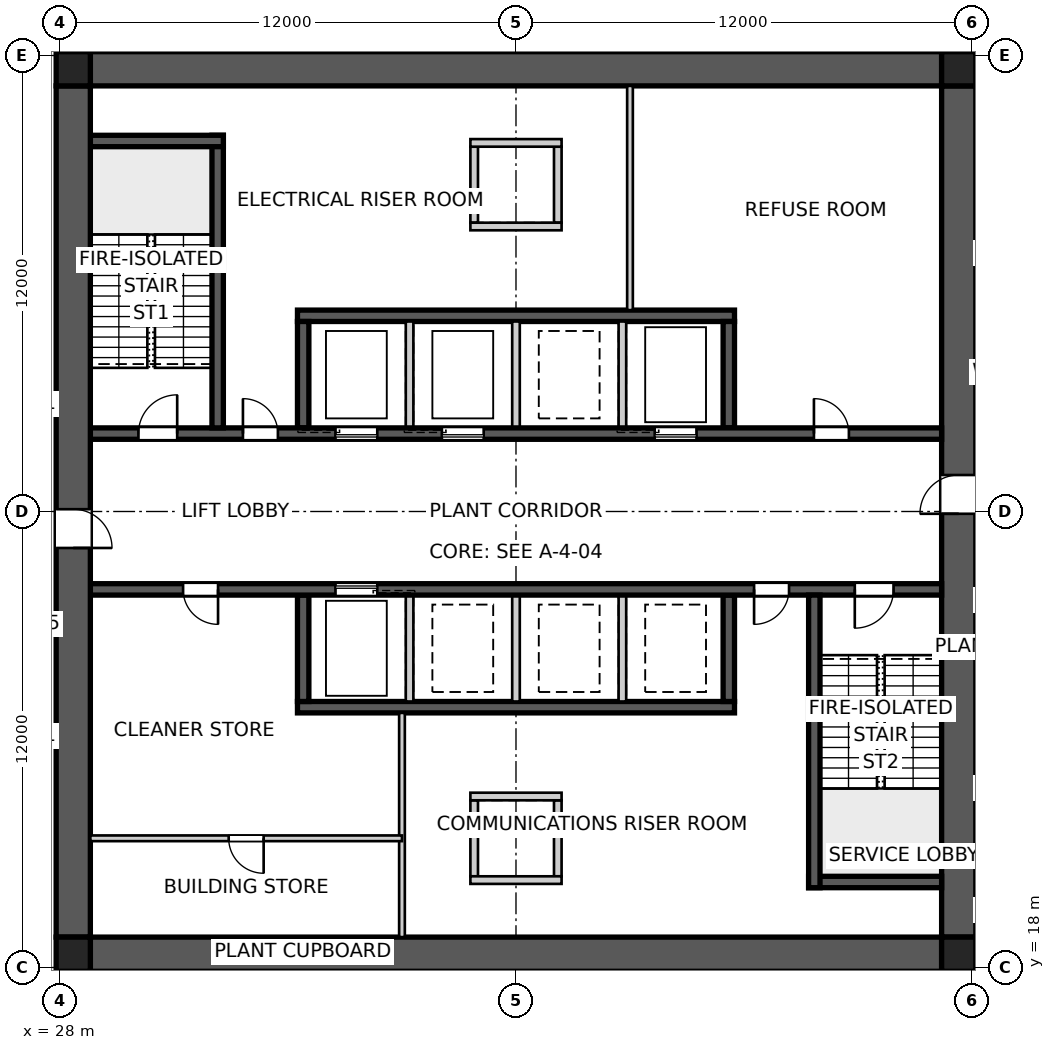
"""IFC4 building model, lengths in metres.
Left out: names, types, materials, properties, quantities, classifications, styles, units other than length and angle.
Written with IfcOpenShell. Run it as: python <this file> out.ifc"""

import sys

from ifc_helpers import new_model, si_unit, direction, frame, frame_2d, origin, origin_2d, place, context, subcontext, project, spatial, polyline, rectangle, outline, extrude, element, fill, save


model = new_model("IFC4")
c1 = context("Model", 3, precision=1e-05, world=origin(), true_north=direction((0.0, 1.0)))
c2 = subcontext(c1, "Body", "Model", "MODEL_VIEW")
j1 = project(units=[si_unit("LENGTHUNIT", "METRE"), si_unit("PLANEANGLEUNIT", "RADIAN")], contexts=[c1])
p1 = place(None, origin())
s1 = spatial("IfcSite", under=j1, at=p1, CompositionType="ELEMENT")
p2 = place(p1, origin())
s2 = spatial("IfcBuilding", under=s1, at=p2, CompositionType="ELEMENT")
p3 = place(p2, frame((0.0, 0.0, 106.6)))
s3 = spatial("IfcBuildingStorey", under=s2, at=p3, CompositionType="ELEMENT", Elevation=106.6)
for number, where, z_axis, x_axis in (
    (1, (28.8, 41.65, 0.0), (0.0, 0.0, 1.0), (1.0, 0.0, 0.0)),
    (2, (51.2, 18.35, 0.0), (0.0, 0.0, 1.0), (-1.0, 0.0, 0.0)),
):
    element("IfcWall", number, at=place(p3, frame(where, z_axis=z_axis, x_axis=x_axis)), inside=s3, PredefinedType="SHEAR", context=c2, shape_type="SweptSolid", body=[
        extrude(outline(polyline([(0.0, -0.45), (22.4, -0.45), (22.4, -0.025), (22.85, -0.025), (22.85, 0.025), (22.4, 0.025), (22.4, 0.45), (0.0, 0.45), (0.0, 0.025), (-0.45, 0.025), (-0.45, -0.025), (0.0, -0.025), (0.0, -0.45)])), origin(), (0.0, 0.0, 1.0), 5.0),
    ])
p4 = place(p3, frame((51.65, 18.8, 0.0), z_axis=(0.0, 0.0, 1.0), x_axis=(0.0, 1.0, 0.0)))
e3 = element("IfcWall", 3, at=p4, inside=s3, PredefinedType="SHEAR", context=c2, shape_type="SweptSolid", body=[
    extrude(outline(polyline([(0.0, -0.45), (22.4, -0.45), (22.4, -0.025), (22.85, -0.025), (22.85, 0.025), (22.4, 0.025), (22.4, 0.45), (0.0, 0.45), (0.0, 0.025), (-0.45, 0.025), (-0.45, -0.025), (0.0, -0.025), (0.0, -0.45)])), origin(), (0.0, 0.0, 1.0), 5.0),
])
p5 = place(p4, frame((11.14, 0.0, 0.0)))
e4 = element("IfcOpeningElement", 4, at=p5, cuts=e3, PredefinedType="OPENING", context=c2, shape_type="SweptSolid", body=[
    extrude(rectangle(XDim=1.02, YDim=2.4, at=frame_2d((0.51, 1.2))), frame((0.0, 0.46, 0.0), z_axis=(0.0, -1.0, 0.0), x_axis=(1.0, 0.0, 0.0)), (0.0, 0.0, 1.0), 0.92),
])
p6 = place(p3, frame((28.35, 41.2, 0.0), z_axis=(0.0, 0.0, 1.0), x_axis=(0.0, -1.0, 0.0)))
e5 = element("IfcWall", 5, at=p6, inside=s3, PredefinedType="SHEAR", context=c2, shape_type="SweptSolid", body=[
    extrude(outline(polyline([(0.0, -0.45), (22.4, -0.45), (22.4, -0.025), (22.85, -0.025), (22.85, 0.025), (22.4, 0.025), (22.4, 0.45), (0.0, 0.45), (0.0, 0.025), (-0.45, 0.025), (-0.45, -0.025), (0.0, -0.025), (0.0, -0.45)])), origin(), (0.0, 0.0, 1.0), 5.0),
])
p7 = place(p6, frame((11.14, 0.0, 0.0)))
e6 = element("IfcOpeningElement", 6, at=p7, cuts=e5, PredefinedType="OPENING", context=c2, shape_type="SweptSolid", body=[
    extrude(rectangle(XDim=1.02, YDim=2.4, at=frame_2d((0.51, 1.2))), frame((0.0, 0.46, 0.0), z_axis=(0.0, -1.0, 0.0), x_axis=(1.0, 0.0, 0.0)), (0.0, 0.0, 1.0), 0.92),
])
p8 = place(p3, frame((28.8, 32.05, 0.0), z_axis=(0.0, 0.0, 1.0), x_axis=(1.0, 0.0, 0.0)))
e7 = element("IfcWall", 7, at=p8, inside=s3, PredefinedType="SHEAR", context=c2, shape_type="SweptSolid", body=[
    extrude(rectangle(XDim=22.4, YDim=0.3, at=frame_2d((11.2, 0.0))), origin(), (0.0, 0.0, 1.0), 5.0),
])
p9 = place(p8, frame((19.04, 0.0, 0.0)))
e8 = element("IfcOpeningElement", 8, at=p9, cuts=e7, PredefinedType="OPENING", context=c2, shape_type="SweptSolid", body=[
    extrude(rectangle(XDim=0.92, YDim=2.1, at=frame_2d((0.46, 1.05))), frame((0.0, 0.16, 0.0), z_axis=(0.0, -1.0, 0.0), x_axis=(1.0, 0.0, 0.0)), (0.0, 0.0, 1.0), 0.32),
])
p10 = place(p8, frame((1.265, 0.0, 0.0)))
e9 = element("IfcOpeningElement", 9, at=p10, cuts=e7, PredefinedType="OPENING", context=c2, shape_type="SweptSolid", body=[
    extrude(rectangle(XDim=1.02, YDim=2.1, at=frame_2d((0.51, 1.05))), frame((0.0, 0.16, 0.0), z_axis=(0.0, -1.0, 0.0), x_axis=(1.0, 0.0, 0.0)), (0.0, 0.0, 1.0), 0.32),
])
p11 = place(p8, frame((4.015, 0.0, 0.0)))
e10 = element("IfcOpeningElement", 10, at=p11, cuts=e7, PredefinedType="OPENING", context=c2, shape_type="SweptSolid", body=[
    extrude(rectangle(XDim=0.92, YDim=2.1, at=frame_2d((0.46, 1.05))), frame((0.0, 0.16, 0.0), z_axis=(0.0, -1.0, 0.0), x_axis=(1.0, 0.0, 0.0)), (0.0, 0.0, 1.0), 0.32),
])
p12 = place(p8, frame((6.45, 0.0, 0.0)))
e11 = element("IfcOpeningElement", 11, at=p12, cuts=e7, PredefinedType="OPENING", context=c2, shape_type="SweptSolid", body=[
    extrude(rectangle(XDim=1.1, YDim=2.1, at=frame_2d((0.55, 1.05))), frame((0.0, 0.16, 0.0), z_axis=(0.0, -1.0, 0.0), x_axis=(1.0, 0.0, 0.0)), (0.0, 0.0, 1.0), 0.32),
])
p13 = place(p8, frame((9.25, 0.0, 0.0)))
e12 = element("IfcOpeningElement", 12, at=p13, cuts=e7, PredefinedType="OPENING", context=c2, shape_type="SweptSolid", body=[
    extrude(rectangle(XDim=1.1, YDim=2.1, at=frame_2d((0.55, 1.05))), frame((0.0, 0.16, 0.0), z_axis=(0.0, -1.0, 0.0), x_axis=(1.0, 0.0, 0.0)), (0.0, 0.0, 1.0), 0.32),
])
p14 = place(p8, frame((14.85, 0.0, 0.0)))
e13 = element("IfcOpeningElement", 13, at=p14, cuts=e7, PredefinedType="OPENING", context=c2, shape_type="SweptSolid", body=[
    extrude(rectangle(XDim=1.1, YDim=2.1, at=frame_2d((0.55, 1.05))), frame((0.0, 0.16, 0.0), z_axis=(0.0, -1.0, 0.0), x_axis=(1.0, 0.0, 0.0)), (0.0, 0.0, 1.0), 0.32),
])
p15 = place(p3, frame((51.2, 27.95, 0.0), z_axis=(0.0, 0.0, 1.0), x_axis=(-1.0, 0.0, 0.0)))
e14 = element("IfcWall", 14, at=p15, inside=s3, PredefinedType="SHEAR", context=c2, shape_type="SweptSolid", body=[
    extrude(rectangle(XDim=22.4, YDim=0.3, at=frame_2d((11.2, 0.0))), origin(), (0.0, 0.0, 1.0), 5.0),
])
p16 = place(p15, frame((19.04, 0.0, 0.0)))
e15 = element("IfcOpeningElement", 15, at=p16, cuts=e14, PredefinedType="OPENING", context=c2, shape_type="SweptSolid", body=[
    extrude(rectangle(XDim=0.92, YDim=2.1, at=frame_2d((0.46, 1.05))), frame((0.0, 0.16, 0.0), z_axis=(0.0, -1.0, 0.0), x_axis=(1.0, 0.0, 0.0)), (0.0, 0.0, 1.0), 0.32),
])
p17 = place(p15, frame((1.265, 0.0, 0.0)))
e16 = element("IfcOpeningElement", 16, at=p17, cuts=e14, PredefinedType="OPENING", context=c2, shape_type="SweptSolid", body=[
    extrude(rectangle(XDim=1.02, YDim=2.1, at=frame_2d((0.51, 1.05))), frame((0.0, 0.16, 0.0), z_axis=(0.0, -1.0, 0.0), x_axis=(1.0, 0.0, 0.0)), (0.0, 0.0, 1.0), 0.32),
])
p18 = place(p15, frame((4.015, 0.0, 0.0)))
e17 = element("IfcOpeningElement", 17, at=p18, cuts=e14, PredefinedType="OPENING", context=c2, shape_type="SweptSolid", body=[
    extrude(rectangle(XDim=0.92, YDim=2.1, at=frame_2d((0.46, 1.05))), frame((0.0, 0.16, 0.0), z_axis=(0.0, -1.0, 0.0), x_axis=(1.0, 0.0, 0.0)), (0.0, 0.0, 1.0), 0.32),
])
p19 = place(p15, frame((14.85, 0.0, 0.0)))
e18 = element("IfcOpeningElement", 18, at=p19, cuts=e14, PredefinedType="OPENING", context=c2, shape_type="SweptSolid", body=[
    extrude(rectangle(XDim=1.1, YDim=2.1, at=frame_2d((0.55, 1.05))), frame((0.0, 0.16, 0.0), z_axis=(0.0, -1.0, 0.0), x_axis=(1.0, 0.0, 0.0)), (0.0, 0.0, 1.0), 0.32),
])
for number, where, z_axis, x_axis in (
    (19, (34.25, 35.15, 0.0), (0.0, 0.0, 1.0), (1.0, 0.0, 0.0)),
    (20, (45.75, 24.85, 0.0), (0.0, 0.0, 1.0), (-1.0, 0.0, 0.0)),
):
    element("IfcWall", number, at=place(p3, frame(where, z_axis=z_axis, x_axis=x_axis)), inside=s3, PredefinedType="SHEAR", context=c2, shape_type="SweptSolid", body=[
        extrude(rectangle(XDim=11.5, YDim=0.3, at=frame_2d((5.75, 0.0))), origin(), (0.0, 0.0, 1.0), 5.0),
    ])
for number, where, z_axis, x_axis in (
    (21, (34.4, 32.2, 0.0), (0.0, 0.0, 1.0), (0.0, 1.0, 0.0)),
    (22, (45.6, 27.8, 0.0), (0.0, 0.0, 1.0), (0.0, -1.0, 0.0)),
):
    element("IfcWall", number, at=place(p3, frame(where, z_axis=z_axis, x_axis=x_axis)), inside=s3, PredefinedType="SHEAR", context=c2, shape_type="SweptSolid", body=[
        extrude(rectangle(XDim=2.8, YDim=0.3, at=frame_2d((1.4, 0.0))), origin(), (0.0, 0.0, 1.0), 5.0),
    ])
for number, where, z_axis, x_axis in (
    (23, (37.2, 32.2, 0.0), (0.0, 0.0, 1.0), (0.0, 1.0, 0.0)),
    (24, (42.8, 27.8, 0.0), (0.0, 0.0, 1.0), (0.0, -1.0, 0.0)),
    (25, (40.0, 32.2, 0.0), (0.0, 0.0, 1.0), (0.0, 1.0, 0.0)),
    (26, (40.0, 27.8, 0.0), (0.0, 0.0, 1.0), (0.0, -1.0, 0.0)),
    (27, (42.8, 32.2, 0.0), (0.0, 0.0, 1.0), (0.0, 1.0, 0.0)),
    (28, (37.2, 27.8, 0.0), (0.0, 0.0, 1.0), (0.0, -1.0, 0.0)),
):
    element("IfcWall", number, at=place(p3, frame(where, z_axis=z_axis, x_axis=x_axis)), inside=s3, PredefinedType="SOLIDWALL", context=c2, shape_type="SweptSolid", body=[
        extrude(rectangle(XDim=2.8, YDim=0.2, at=frame_2d((1.4, 0.0))), origin(), (0.0, 0.0, 1.0), 5.0),
    ])
for number, where, z_axis, x_axis in (
    (29, (45.6, 32.2, 0.0), (0.0, 0.0, 1.0), (0.0, 1.0, 0.0)),
    (30, (34.4, 27.8, 0.0), (0.0, 0.0, 1.0), (0.0, -1.0, 0.0)),
):
    element("IfcWall", number, at=place(p3, frame(where, z_axis=z_axis, x_axis=x_axis)), inside=s3, PredefinedType="SHEAR", context=c2, shape_type="SweptSolid", body=[
        extrude(rectangle(XDim=2.8, YDim=0.3, at=frame_2d((1.4, 0.0))), origin(), (0.0, 0.0, 1.0), 5.0),
    ])
p20 = place(p3, frame((32.15, 32.2, 0.0), z_axis=(0.0, 0.0, 1.0), x_axis=(0.0, 1.0, 0.0)))
e31 = element("IfcWall", 31, at=p20, inside=s3, PredefinedType="SHEAR", context=c2, shape_type="SweptSolid", body=[
    extrude(rectangle(XDim=7.7, YDim=0.3, at=frame_2d((3.85, 0.0))), origin(), (0.0, 0.0, 1.0), 5.0),
])
p21 = place(p3, frame((28.8, 39.75, 0.0), z_axis=(0.0, 0.0, 1.0), x_axis=(1.0, 0.0, 0.0)))
e32 = element("IfcWall", 32, at=p21, inside=s3, PredefinedType="SHEAR", context=c2, shape_type="SweptSolid", body=[
    extrude(rectangle(XDim=3.5, YDim=0.3, at=frame_2d((1.75, 0.0))), origin(), (0.0, 0.0, 1.0), 5.0),
])
p22 = place(p3, frame((47.85, 27.8, 0.0), z_axis=(0.0, 0.0, 1.0), x_axis=(0.0, -1.0, 0.0)))
e33 = element("IfcWall", 33, at=p22, inside=s3, PredefinedType="SHEAR", context=c2, shape_type="SweptSolid", body=[
    extrude(rectangle(XDim=7.7, YDim=0.3, at=frame_2d((3.85, 0.0))), origin(), (0.0, 0.0, 1.0), 5.0),
])
p23 = place(p3, frame((51.2, 20.25, 0.0), z_axis=(0.0, 0.0, 1.0), x_axis=(-1.0, 0.0, 0.0)))
e34 = element("IfcWall", 34, at=p23, inside=s3, PredefinedType="SHEAR", context=c2, shape_type="SweptSolid", body=[
    extrude(rectangle(XDim=3.5, YDim=0.3, at=frame_2d((1.75, 0.0))), origin(), (0.0, 0.0, 1.0), 5.0),
])
for number, where, z_axis, x_axis in (
    (35, (38.9, 37.6, 0.0), (0.0, 0.0, 1.0), (0.0, 1.0, 0.0)),
    (36, (41.1, 37.6, 0.0), (0.0, 0.0, 1.0), (0.0, 1.0, 0.0)),
):
    element("IfcWall", number, at=place(p3, frame(where, z_axis=z_axis, x_axis=x_axis)), inside=s3, PredefinedType="SOLIDWALL", context=c2, shape_type="SweptSolid", body=[
        extrude(rectangle(XDim=2.0, YDim=0.2, at=frame_2d((1.0, 0.0))), origin(), (0.0, 0.0, 1.0), 5.0),
    ])
for number, where, z_axis, x_axis in (
    (37, (38.8, 37.5, 0.0), (0.0, 0.0, 1.0), (1.0, 0.0, 0.0)),
    (38, (38.8, 39.7, 0.0), (0.0, 0.0, 1.0), (1.0, 0.0, 0.0)),
):
    element("IfcWall", number, at=place(p3, frame(where, z_axis=z_axis, x_axis=x_axis)), inside=s3, PredefinedType="SOLIDWALL", context=c2, shape_type="SweptSolid", body=[
        extrude(rectangle(XDim=2.4, YDim=0.2, at=frame_2d((1.2, 0.0))), origin(), (0.0, 0.0, 1.0), 5.0),
    ])
for number, where, z_axis, x_axis in (
    (39, (38.9, 22.4, 0.0), (0.0, 0.0, 1.0), (0.0, -1.0, 0.0)),
    (40, (41.1, 22.4, 0.0), (0.0, 0.0, 1.0), (0.0, -1.0, 0.0)),
):
    element("IfcWall", number, at=place(p3, frame(where, z_axis=z_axis, x_axis=x_axis)), inside=s3, PredefinedType="SOLIDWALL", context=c2, shape_type="SweptSolid", body=[
        extrude(rectangle(XDim=2.0, YDim=0.2, at=frame_2d((1.0, 0.0))), origin(), (0.0, 0.0, 1.0), 5.0),
    ])
for number, where, z_axis, x_axis in (
    (41, (38.8, 22.5, 0.0), (0.0, 0.0, 1.0), (1.0, 0.0, 0.0)),
    (42, (38.8, 20.3, 0.0), (0.0, 0.0, 1.0), (1.0, 0.0, 0.0)),
):
    element("IfcWall", number, at=place(p3, frame(where, z_axis=z_axis, x_axis=x_axis)), inside=s3, PredefinedType="SOLIDWALL", context=c2, shape_type="SweptSolid", body=[
        extrude(rectangle(XDim=2.4, YDim=0.2, at=frame_2d((1.2, 0.0))), origin(), (0.0, 0.0, 1.0), 5.0),
    ])
for number, where, z_axis, x_axis in (
    (43, (28.35, 18.35, 0.0), (0.0, 0.0, 1.0), (1.0, 0.0, 0.0)),
    (44, (51.65, 18.35, 0.0), (0.0, 0.0, 1.0), (1.0, 0.0, 0.0)),
    (45, (51.65, 41.65, 0.0), (0.0, 0.0, 1.0), (1.0, 0.0, 0.0)),
    (46, (28.35, 41.65, 0.0), (0.0, 0.0, 1.0), (1.0, 0.0, 0.0)),
):
    element("IfcColumn", number, at=place(p3, frame(where, z_axis=z_axis, x_axis=x_axis)), inside=s3, PredefinedType="COLUMN", context=c2, shape_type="SweptSolid", body=[
        extrude(rectangle(XDim=0.9, YDim=0.9, at=origin_2d()), origin(), (0.0, 0.0, 1.0), 5.0),
    ])
for number, where, z_axis, x_axis in (
    (47, (43.0, 41.2, 0.0), (0.0, 0.0, 1.0), (0.0, -1.0, 0.0)),
    (48, (37.0, 18.8, 0.0), (0.0, 0.0, 1.0), (0.0, 1.0, 0.0)),
):
    element("IfcWall", number, at=place(p3, frame(where, z_axis=z_axis, x_axis=x_axis)), inside=s3, PredefinedType="SOLIDWALL", context=c2, shape_type="SweptSolid", body=[
        extrude(rectangle(XDim=5.9, YDim=0.15, at=frame_2d((2.95, 0.0))), origin(), (0.0, 0.0, 1.0), 4.85),
    ])
p24 = place(p3, frame((37.0, 21.4, 0.0), z_axis=(0.0, 0.0, 1.0), x_axis=(-1.0, 0.0, 0.0)))
e49 = element("IfcWall", 49, at=p24, inside=s3, PredefinedType="SOLIDWALL", context=c2, shape_type="SweptSolid", body=[
    extrude(rectangle(XDim=8.2, YDim=0.15, at=frame_2d((4.1, 0.0))), origin(), (0.0, 0.0, 1.0), 4.85),
])
p25 = place(p24, frame((3.64, 0.0, 0.0)))
e50 = element("IfcOpeningElement", 50, at=p25, cuts=e49, PredefinedType="OPENING", context=c2, shape_type="SweptSolid", body=[
    extrude(rectangle(XDim=0.92, YDim=2.1, at=frame_2d((0.46, 1.05))), frame((0.0, 0.085, 0.0), z_axis=(0.0, -1.0, 0.0), x_axis=(1.0, 0.0, 0.0)), (0.0, 0.0, 1.0), 0.17),
])
p26 = place(p9, origin())
e51 = element("IfcDoor", 51, at=p26, inside=s3, OperationType="SINGLE_SWING_LEFT", PredefinedType="DOOR", context=c2, shape_type="SweptSolid", body=[
    extrude(rectangle(XDim=0.92, YDim=2.1, at=frame_2d((0.46, 1.05))), frame((0.0, 0.025, 0.0), z_axis=(0.0, -1.0, 0.0), x_axis=(1.0, 0.0, 0.0)), (0.0, 0.0, 1.0), 0.05),
])
fill(e8, e51)
p27 = place(p16, origin())
e52 = element("IfcDoor", 52, at=p27, inside=s3, OperationType="SINGLE_SWING_LEFT", PredefinedType="DOOR", context=c2, shape_type="SweptSolid", body=[
    extrude(rectangle(XDim=0.92, YDim=2.1, at=frame_2d((0.46, 1.05))), frame((0.0, 0.025, 0.0), z_axis=(0.0, -1.0, 0.0), x_axis=(1.0, 0.0, 0.0)), (0.0, 0.0, 1.0), 0.05),
])
fill(e15, e52)
p28 = place(p17, origin())
e53 = element("IfcDoor", 53, at=p28, inside=s3, OperationType="SINGLE_SWING_RIGHT", PredefinedType="DOOR", context=c2, shape_type="SweptSolid", body=[
    extrude(rectangle(XDim=1.02, YDim=2.1, at=frame_2d((0.51, 1.05))), frame((0.0, 0.025, 0.0), z_axis=(0.0, -1.0, 0.0), x_axis=(1.0, 0.0, 0.0)), (0.0, 0.0, 1.0), 0.05),
])
fill(e16, e53)
p29 = place(p10, origin())
e54 = element("IfcDoor", 54, at=p29, inside=s3, OperationType="SINGLE_SWING_RIGHT", PredefinedType="DOOR", context=c2, shape_type="SweptSolid", body=[
    extrude(rectangle(XDim=1.02, YDim=2.1, at=frame_2d((0.51, 1.05))), frame((0.0, 0.025, 0.0), z_axis=(0.0, -1.0, 0.0), x_axis=(1.0, 0.0, 0.0)), (0.0, 0.0, 1.0), 0.05),
])
fill(e9, e54)
p30 = place(p11, origin())
e55 = element("IfcDoor", 55, at=p30, inside=s3, OperationType="SINGLE_SWING_LEFT", PredefinedType="DOOR", context=c2, shape_type="SweptSolid", body=[
    extrude(rectangle(XDim=0.92, YDim=2.1, at=frame_2d((0.46, 1.05))), frame((0.0, 0.025, 0.0), z_axis=(0.0, -1.0, 0.0), x_axis=(1.0, 0.0, 0.0)), (0.0, 0.0, 1.0), 0.05),
])
fill(e10, e55)
p31 = place(p18, origin())
e56 = element("IfcDoor", 56, at=p31, inside=s3, OperationType="SINGLE_SWING_RIGHT", PredefinedType="DOOR", context=c2, shape_type="SweptSolid", body=[
    extrude(rectangle(XDim=0.92, YDim=2.1, at=frame_2d((0.46, 1.05))), frame((0.0, 0.025, 0.0), z_axis=(0.0, -1.0, 0.0), x_axis=(1.0, 0.0, 0.0)), (0.0, 0.0, 1.0), 0.05),
])
fill(e17, e56)
p32 = place(p25, origin())
e57 = element("IfcDoor", 57, at=p32, inside=s3, OperationType="SINGLE_SWING_LEFT", PredefinedType="DOOR", context=c2, shape_type="SweptSolid", body=[
    extrude(rectangle(XDim=0.92, YDim=2.1, at=frame_2d((0.46, 1.05))), frame((0.0, 0.025, 0.0), z_axis=(0.0, -1.0, 0.0), x_axis=(1.0, 0.0, 0.0)), (0.0, 0.0, 1.0), 0.05),
])
fill(e50, e57)
p33 = place(p5, origin())
e58 = element("IfcDoor", 58, at=p33, inside=s3, OperationType="SINGLE_SWING_LEFT", PredefinedType="DOOR", context=c2, shape_type="SweptSolid", body=[
    extrude(rectangle(XDim=1.02, YDim=2.4, at=frame_2d((0.51, 1.2))), frame((0.0, 0.025, 0.0), z_axis=(0.0, -1.0, 0.0), x_axis=(1.0, 0.0, 0.0)), (0.0, 0.0, 1.0), 0.05),
])
fill(e4, e58)
p34 = place(p7, origin())
e59 = element("IfcDoor", 59, at=p34, inside=s3, OperationType="SINGLE_SWING_RIGHT", PredefinedType="DOOR", context=c2, shape_type="SweptSolid", body=[
    extrude(rectangle(XDim=1.02, YDim=2.4, at=frame_2d((0.51, 1.2))), frame((0.0, 0.025, 0.0), z_axis=(0.0, -1.0, 0.0), x_axis=(1.0, 0.0, 0.0)), (0.0, 0.0, 1.0), 0.05),
])
fill(e6, e59)
p35 = place(p12, origin())
e60 = element("IfcDoor", 60, at=p35, inside=s3, OperationType="SLIDING_TO_LEFT", PredefinedType="DOOR", context=c2, shape_type="SweptSolid", body=[
    extrude(rectangle(XDim=1.1, YDim=2.1, at=frame_2d((0.55, 1.05))), frame((0.0, 0.025, 0.0), z_axis=(0.0, -1.0, 0.0), x_axis=(1.0, 0.0, 0.0)), (0.0, 0.0, 1.0), 0.05),
])
fill(e11, e60)
p36 = place(p13, origin())
e61 = element("IfcDoor", 61, at=p36, inside=s3, OperationType="SLIDING_TO_LEFT", PredefinedType="DOOR", context=c2, shape_type="SweptSolid", body=[
    extrude(rectangle(XDim=1.1, YDim=2.1, at=frame_2d((0.55, 1.05))), frame((0.0, 0.025, 0.0), z_axis=(0.0, -1.0, 0.0), x_axis=(1.0, 0.0, 0.0)), (0.0, 0.0, 1.0), 0.05),
])
fill(e12, e61)
p37 = place(p14, origin())
e62 = element("IfcDoor", 62, at=p37, inside=s3, OperationType="SLIDING_TO_LEFT", PredefinedType="DOOR", context=c2, shape_type="SweptSolid", body=[
    extrude(rectangle(XDim=1.1, YDim=2.1, at=frame_2d((0.55, 1.05))), frame((0.0, 0.025, 0.0), z_axis=(0.0, -1.0, 0.0), x_axis=(1.0, 0.0, 0.0)), (0.0, 0.0, 1.0), 0.05),
])
fill(e13, e62)
p38 = place(p19, origin())
e63 = element("IfcDoor", 63, at=p38, inside=s3, OperationType="SLIDING_TO_LEFT", PredefinedType="DOOR", context=c2, shape_type="SweptSolid", body=[
    extrude(rectangle(XDim=1.1, YDim=2.1, at=frame_2d((0.55, 1.05))), frame((0.0, 0.025, 0.0), z_axis=(0.0, -1.0, 0.0), x_axis=(1.0, 0.0, 0.0)), (0.0, 0.0, 1.0), 0.05),
])
fill(e18, e63)
save(model, sys.argv[1])
